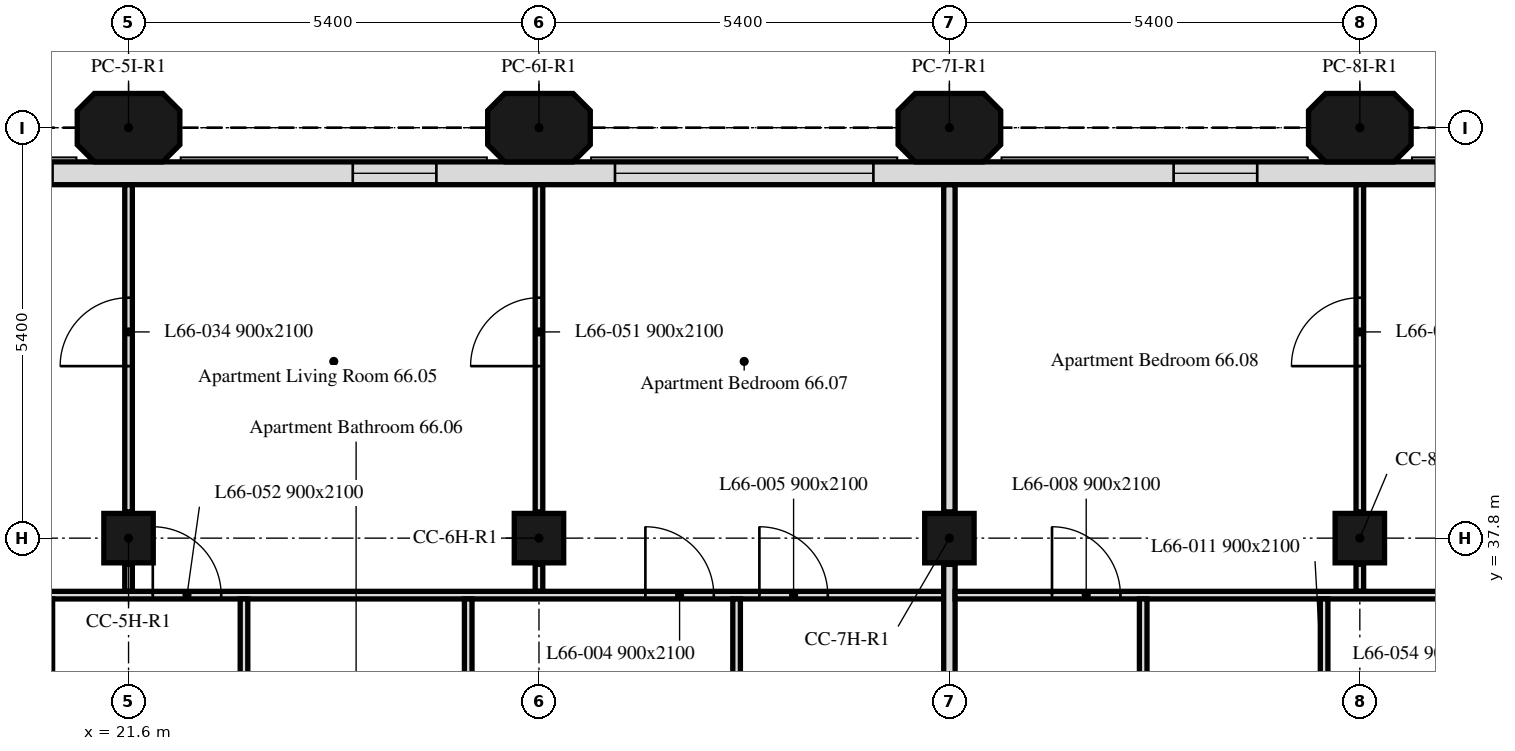
"""IFC4 building model, lengths in metres.
Left out: names, types, materials, properties, quantities, classifications, styles, units other than length and angle.
Written with IfcOpenShell. Run it as: python <this file> out.ifc"""

import sys

from ifc_helpers import new_model, si_unit, direction, frame, frame_2d, origin, origin_2d, place, context, subcontext, project, spatial, polyline, rectangle, outline, extrude, element, fill, save


model = new_model("IFC4")
c1 = context("Model", 3, precision=1e-05, world=origin(), true_north=direction((0.0, 1.0)))
c2 = subcontext(c1, "Body", "Model", "MODEL_VIEW")
j1 = project(units=[si_unit("LENGTHUNIT", "METRE"), si_unit("PLANEANGLEUNIT", "RADIAN")], contexts=[c1])
p1 = place(None, origin())
s1 = spatial("IfcSite", under=j1, at=p1, CompositionType="ELEMENT")
p2 = place(p1, origin())
s2 = spatial("IfcBuilding", under=s1, at=p2, CompositionType="ELEMENT")
p3 = place(p2, frame((0.0, 0.0, 271.9)))
s3 = spatial("IfcBuildingStorey", under=s2, at=p3, CompositionType="ELEMENT", Elevation=271.9)
for number, where, z_axis, x_axis in (
    (1, (21.6, 37.8, 0.0), (0.0, 0.0, 1.0), (1.0, 0.0, 0.0)),
    (2, (27.0, 37.8, 0.0), (0.0, 0.0, 1.0), (1.0, 0.0, 0.0)),
    (3, (32.4, 37.8, 0.0), (0.0, 0.0, 1.0), (1.0, 0.0, 0.0)),
    (4, (37.8, 37.8, 0.0), (0.0, 0.0, 1.0), (1.0, 0.0, 0.0)),
):
    element("IfcColumn", number, at=place(p3, frame(where, z_axis=z_axis, x_axis=x_axis)), inside=s3, PredefinedType="COLUMN", context=c2, shape_type="SweptSolid", body=[
        extrude(rectangle(XDim=0.65, YDim=0.65, at=origin_2d()), origin(), (0.0, 0.0, 1.0), 3.0),
    ])
for number, where, z_axis, x_axis in (
    (5, (21.6, 43.2, 0.0), (0.0, 0.0, 1.0), (1.0, 0.0, 0.0)),
    (6, (27.0, 43.2, 0.0), (0.0, 0.0, 1.0), (1.0, 0.0, 0.0)),
    (7, (32.4, 43.2, 0.0), (0.0, 0.0, 1.0), (1.0, 0.0, 0.0)),
    (8, (37.8, 43.2, 0.0), (0.0, 0.0, 1.0), (1.0, 0.0, 0.0)),
):
    element("IfcColumn", number, at=place(p3, frame(where, z_axis=z_axis, x_axis=x_axis)), inside=s3, PredefinedType="COLUMN", context=c2, shape_type="SweptSolid", body=[
        extrude(outline(polyline([(-0.45, -0.45), (0.45, -0.45), (0.675, -0.225), (0.675, 0.225), (0.45, 0.45), (-0.45, 0.45), (-0.675, 0.225), (-0.675, -0.225), (-0.45, -0.45)])), origin(), (0.0, 0.0, 1.0), 3.0),
    ])
p4 = place(p3, frame((43.014, 42.6, 0.0), z_axis=(0.0, 0.0, 1.0), x_axis=(-1.0, 0.0, 0.0)))
e9 = element("IfcWall", 9, at=p4, inside=s3, PredefinedType="SOLIDWALL", context=c2, shape_type="SweptSolid", body=[
    extrude(rectangle(XDim=32.027, YDim=0.3, at=frame_2d((16.014, 0.0))), origin(), (0.0, 0.0, 1.0), 3.0),
])
p5 = place(p4, frame((0.814, 0.0, 0.9)))
e10 = element("IfcOpeningElement", 10, at=p5, cuts=e9, PredefinedType="OPENING", context=c2, shape_type="SweptSolid", body=[
    extrude(rectangle(XDim=3.4, YDim=1.7, at=frame_2d((1.7, 0.85))), frame((0.0, 0.16, 0.0), z_axis=(0.0, -1.0, 0.0), x_axis=(1.0, 0.0, 0.0)), (0.0, 0.0, 1.0), 0.32),
])
p6 = place(p4, frame((6.564, 0.0, 0.9)))
e11 = element("IfcOpeningElement", 11, at=p6, cuts=e9, PredefinedType="OPENING", context=c2, shape_type="SweptSolid", body=[
    extrude(rectangle(XDim=1.1, YDim=1.7, at=frame_2d((0.55, 0.85))), frame((0.0, 0.16, 0.0), z_axis=(0.0, -1.0, 0.0), x_axis=(1.0, 0.0, 0.0)), (0.0, 0.0, 1.0), 0.32),
])
p7 = place(p4, frame((11.614, 0.0, 0.9)))
e12 = element("IfcOpeningElement", 12, at=p7, cuts=e9, PredefinedType="OPENING", context=c2, shape_type="SweptSolid", body=[
    extrude(rectangle(XDim=3.4, YDim=1.7, at=frame_2d((1.7, 0.85))), frame((0.0, 0.16, 0.0), z_axis=(0.0, -1.0, 0.0), x_axis=(1.0, 0.0, 0.0)), (0.0, 0.0, 1.0), 0.32),
])
p8 = place(p4, frame((17.364, 0.0, 0.9)))
e13 = element("IfcOpeningElement", 13, at=p8, cuts=e9, PredefinedType="OPENING", context=c2, shape_type="SweptSolid", body=[
    extrude(rectangle(XDim=1.1, YDim=1.7, at=frame_2d((0.55, 0.85))), frame((0.0, 0.16, 0.0), z_axis=(0.0, -1.0, 0.0), x_axis=(1.0, 0.0, 0.0)), (0.0, 0.0, 1.0), 0.32),
])
p9 = place(p4, frame((22.414, 0.0, 0.9)))
e14 = element("IfcOpeningElement", 14, at=p9, cuts=e9, PredefinedType="OPENING", context=c2, shape_type="SweptSolid", body=[
    extrude(rectangle(XDim=3.4, YDim=1.7, at=frame_2d((1.7, 0.85))), frame((0.0, 0.16, 0.0), z_axis=(0.0, -1.0, 0.0), x_axis=(1.0, 0.0, 0.0)), (0.0, 0.0, 1.0), 0.32),
])
p10 = place(p4, frame((28.164, 0.0, 0.9)))
e15 = element("IfcOpeningElement", 15, at=p10, cuts=e9, PredefinedType="OPENING", context=c2, shape_type="SweptSolid", body=[
    extrude(rectangle(XDim=1.1, YDim=1.7, at=frame_2d((0.55, 0.85))), frame((0.0, 0.16, 0.0), z_axis=(0.0, -1.0, 0.0), x_axis=(1.0, 0.0, 0.0)), (0.0, 0.0, 1.0), 0.32),
])
p11 = place(p3, frame((21.6, 37.1, 0.0), z_axis=(0.0, 0.0, 1.0), x_axis=(0.0, 1.0, 0.0)))
e16 = element("IfcWall", 16, at=p11, inside=s3, PredefinedType="PARTITIONING", context=c2, shape_type="SweptSolid", body=[
    extrude(rectangle(XDim=0.355, YDim=0.1, at=frame_2d((0.177, 0.0))), origin(), (0.0, 0.0, 1.0), 3.0),
])
p12 = place(p3, frame((21.6, 38.145, 0.0), z_axis=(0.0, 0.0, 1.0), x_axis=(0.0, 1.0, 0.0)))
e17 = element("IfcWall", 17, at=p12, inside=s3, PredefinedType="PARTITIONING", context=c2, shape_type="SweptSolid", body=[
    extrude(rectangle(XDim=4.304, YDim=0.1, at=frame_2d((2.152, 0.0))), origin(), (0.0, 0.0, 1.0), 3.0),
])
p13 = place(p12, frame((1.918, 0.0, 0.0)))
e18 = element("IfcOpeningElement", 18, at=p13, cuts=e17, PredefinedType="OPENING", context=c2, shape_type="SweptSolid", body=[
    extrude(rectangle(XDim=0.9, YDim=2.1, at=frame_2d((0.45, 1.05))), frame((0.0, 0.05, 0.0), z_axis=(0.0, -1.0, 0.0), x_axis=(1.0, 0.0, 0.0)), (0.0, 0.0, 1.0), 0.1),
])
p14 = place(p3, frame((27.0, 37.1, 0.0), z_axis=(0.0, 0.0, 1.0), x_axis=(0.0, 1.0, 0.0)))
e19 = element("IfcWall", 19, at=p14, inside=s3, PredefinedType="PARTITIONING", context=c2, shape_type="SweptSolid", body=[
    extrude(rectangle(XDim=0.355, YDim=0.1, at=frame_2d((0.177, 0.0))), origin(), (0.0, 0.0, 1.0), 3.0),
])
p15 = place(p3, frame((27.0, 38.145, 0.0), z_axis=(0.0, 0.0, 1.0), x_axis=(0.0, 1.0, 0.0)))
e20 = element("IfcWall", 20, at=p15, inside=s3, PredefinedType="PARTITIONING", context=c2, shape_type="SweptSolid", body=[
    extrude(rectangle(XDim=4.304, YDim=0.1, at=frame_2d((2.152, 0.0))), origin(), (0.0, 0.0, 1.0), 3.0),
])
p16 = place(p15, frame((1.918, 0.0, 0.0)))
e21 = element("IfcOpeningElement", 21, at=p16, cuts=e20, PredefinedType="OPENING", context=c2, shape_type="SweptSolid", body=[
    extrude(rectangle(XDim=0.9, YDim=2.1, at=frame_2d((0.45, 1.05))), frame((0.0, 0.05, 0.0), z_axis=(0.0, -1.0, 0.0), x_axis=(1.0, 0.0, 0.0)), (0.0, 0.0, 1.0), 0.1),
])
p17 = place(p3, frame((16.275, 37.05, 0.0), z_axis=(0.0, 0.0, 1.0), x_axis=(1.0, 0.0, 0.0)))
e22 = element("IfcWall", 22, at=p17, inside=s3, PredefinedType="PARTITIONING", context=c2, shape_type="SweptSolid", body=[
    extrude(rectangle(XDim=16.05, YDim=0.1, at=frame_2d((8.025, 0.0))), origin(), (0.0, 0.0, 1.0), 3.0),
])
p18 = place(p17, frame((1.453, 0.0, 0.0)))
e23 = element("IfcOpeningElement", 23, at=p18, cuts=e22, PredefinedType="OPENING", context=c2, shape_type="SweptSolid", body=[
    extrude(rectangle(XDim=0.9, YDim=2.1, at=frame_2d((0.45, 1.05))), frame((0.0, 0.05, 0.0), z_axis=(0.0, -1.0, 0.0), x_axis=(1.0, 0.0, 0.0)), (0.0, 0.0, 1.0), 0.1),
])
p19 = place(p17, frame((12.125, 0.0, 0.0)))
e24 = element("IfcOpeningElement", 24, at=p19, cuts=e22, PredefinedType="OPENING", context=c2, shape_type="SweptSolid", body=[
    extrude(rectangle(XDim=0.9, YDim=2.1, at=frame_2d((0.45, 1.05))), frame((0.0, 0.05, 0.0), z_axis=(0.0, -1.0, 0.0), x_axis=(1.0, 0.0, 0.0)), (0.0, 0.0, 1.0), 0.1),
])
p20 = place(p17, frame((13.625, 0.0, 0.0)))
e25 = element("IfcOpeningElement", 25, at=p20, cuts=e22, PredefinedType="OPENING", context=c2, shape_type="SweptSolid", body=[
    extrude(rectangle(XDim=0.9, YDim=2.1, at=frame_2d((0.45, 1.05))), frame((0.0, 0.05, 0.0), z_axis=(0.0, -1.0, 0.0), x_axis=(1.0, 0.0, 0.0)), (0.0, 0.0, 1.0), 0.1),
])
p21 = place(p17, frame((5.644, 0.0, 0.0)))
e26 = element("IfcOpeningElement", 26, at=p21, cuts=e22, PredefinedType="OPENING", context=c2, shape_type="SweptSolid", body=[
    extrude(rectangle(XDim=0.9, YDim=2.1, at=frame_2d((0.45, 1.05))), frame((0.0, 0.05, 0.0), z_axis=(0.0, -1.0, 0.0), x_axis=(1.0, 0.0, 0.0)), (0.0, 0.0, 1.0), 0.1),
])
p22 = place(p3, frame((32.4, 38.145, 0.0), z_axis=(0.0, 0.0, 1.0), x_axis=(0.0, 1.0, 0.0)))
e27 = element("IfcWall", 27, at=p22, inside=s3, PredefinedType="PARTITIONING", context=c2, shape_type="SweptSolid", body=[
    extrude(rectangle(XDim=4.304, YDim=0.15, at=frame_2d((2.152, 0.0))), origin(), (0.0, 0.0, 1.0), 3.0),
])
p23 = place(p3, frame((20.551, 34.725, 0.0), z_axis=(0.0, 0.0, 1.0), x_axis=(0.0, 1.0, 0.0)))
e28 = element("IfcWall", 28, at=p23, inside=s3, PredefinedType="PARTITIONING", context=c2, shape_type="SweptSolid", body=[
    extrude(rectangle(XDim=2.275, YDim=0.1, at=frame_2d((1.137, 0.0))), origin(), (0.0, 0.0, 1.0), 3.0),
])
p24 = place(p23, frame((0.25, 0.0, 0.0)))
e29 = element("IfcOpeningElement", 29, at=p24, cuts=e28, PredefinedType="OPENING", context=c2, shape_type="SweptSolid", body=[
    extrude(rectangle(XDim=0.9, YDim=2.1, at=frame_2d((0.45, 1.05))), frame((0.0, 0.05, 0.0), z_axis=(0.0, -1.0, 0.0), x_axis=(1.0, 0.0, 0.0)), (0.0, 0.0, 1.0), 0.1),
])
p25 = place(p3, frame((23.119, 34.725, 0.0), z_axis=(0.0, 0.0, 1.0), x_axis=(0.0, 1.0, 0.0)))
e30 = element("IfcWall", 30, at=p25, inside=s3, PredefinedType="PARTITIONING", context=c2, shape_type="SweptSolid", body=[
    extrude(rectangle(XDim=2.275, YDim=0.1, at=frame_2d((1.137, 0.0))), origin(), (0.0, 0.0, 1.0), 3.0),
])
p26 = place(p25, frame((0.25, 0.0, 0.0)))
e31 = element("IfcOpeningElement", 31, at=p26, cuts=e30, PredefinedType="OPENING", context=c2, shape_type="SweptSolid", body=[
    extrude(rectangle(XDim=0.9, YDim=2.1, at=frame_2d((0.45, 1.05))), frame((0.0, 0.05, 0.0), z_axis=(0.0, -1.0, 0.0), x_axis=(1.0, 0.0, 0.0)), (0.0, 0.0, 1.0), 0.1),
])
for number, where, z_axis, x_axis in (
    (32, (26.069, 34.725, 0.0), (0.0, 0.0, 1.0), (0.0, 1.0, 0.0)),
    (33, (29.6, 34.725, 0.0), (0.0, 0.0, 1.0), (0.0, 1.0, 0.0)),
):
    element("IfcWall", number, at=place(p3, frame(where, z_axis=z_axis, x_axis=x_axis)), inside=s3, PredefinedType="PARTITIONING", context=c2, shape_type="SweptSolid", body=[
        extrude(rectangle(XDim=2.275, YDim=0.1, at=frame_2d((1.137, 0.0))), origin(), (0.0, 0.0, 1.0), 3.0),
    ])
p27 = place(p3, frame((32.4, 34.725, 0.0), z_axis=(0.0, 0.0, 1.0), x_axis=(0.0, 1.0, 0.0)))
e34 = element("IfcWall", 34, at=p27, inside=s3, PredefinedType="PARTITIONING", context=c2, shape_type="SweptSolid", body=[
    extrude(rectangle(XDim=2.73, YDim=0.15, at=frame_2d((1.365, 0.0))), origin(), (0.0, 0.0, 1.0), 3.0),
])
p28 = place(p3, frame((37.8, 37.1, 0.0), z_axis=(0.0, 0.0, 1.0), x_axis=(0.0, 1.0, 0.0)))
e35 = element("IfcWall", 35, at=p28, inside=s3, PredefinedType="PARTITIONING", context=c2, shape_type="SweptSolid", body=[
    extrude(rectangle(XDim=0.355, YDim=0.1, at=frame_2d((0.177, 0.0))), origin(), (0.0, 0.0, 1.0), 3.0),
])
p29 = place(p3, frame((37.8, 38.145, 0.0), z_axis=(0.0, 0.0, 1.0), x_axis=(0.0, 1.0, 0.0)))
e36 = element("IfcWall", 36, at=p29, inside=s3, PredefinedType="PARTITIONING", context=c2, shape_type="SweptSolid", body=[
    extrude(rectangle(XDim=4.304, YDim=0.1, at=frame_2d((2.152, 0.0))), origin(), (0.0, 0.0, 1.0), 3.0),
])
p30 = place(p29, frame((1.918, 0.0, 0.0)))
e37 = element("IfcOpeningElement", 37, at=p30, cuts=e36, PredefinedType="OPENING", context=c2, shape_type="SweptSolid", body=[
    extrude(rectangle(XDim=0.9, YDim=2.1, at=frame_2d((0.45, 1.05))), frame((0.0, 0.05, 0.0), z_axis=(0.0, -1.0, 0.0), x_axis=(1.0, 0.0, 0.0)), (0.0, 0.0, 1.0), 0.1),
])
p31 = place(p3, frame((32.475, 37.05, 0.0), z_axis=(0.0, 0.0, 1.0), x_axis=(1.0, 0.0, 0.0)))
e38 = element("IfcWall", 38, at=p31, inside=s3, PredefinedType="PARTITIONING", context=c2, shape_type="SweptSolid", body=[
    extrude(rectangle(XDim=10.485, YDim=0.1, at=frame_2d((5.242, 0.0))), origin(), (0.0, 0.0, 1.0), 3.0),
])
p32 = place(p31, frame((1.275, 0.0, 0.0)))
e39 = element("IfcOpeningElement", 39, at=p32, cuts=e38, PredefinedType="OPENING", context=c2, shape_type="SweptSolid", body=[
    extrude(rectangle(XDim=0.9, YDim=2.1, at=frame_2d((0.45, 1.05))), frame((0.0, 0.05, 0.0), z_axis=(0.0, -1.0, 0.0), x_axis=(1.0, 0.0, 0.0)), (0.0, 0.0, 1.0), 0.1),
])
p33 = place(p31, frame((6.535, 0.0, 0.0)))
e40 = element("IfcOpeningElement", 40, at=p33, cuts=e38, PredefinedType="OPENING", context=c2, shape_type="SweptSolid", body=[
    extrude(rectangle(XDim=0.9, YDim=2.1, at=frame_2d((0.45, 1.05))), frame((0.0, 0.05, 0.0), z_axis=(0.0, -1.0, 0.0), x_axis=(1.0, 0.0, 0.0)), (0.0, 0.0, 1.0), 0.1),
])
p34 = place(p3, frame((34.95, 34.725, 0.0), z_axis=(0.0, 0.0, 1.0), x_axis=(0.0, 1.0, 0.0)))
e41 = element("IfcWall", 41, at=p34, inside=s3, PredefinedType="PARTITIONING", context=c2, shape_type="SweptSolid", body=[
    extrude(rectangle(XDim=2.275, YDim=0.1, at=frame_2d((1.137, 0.0))), origin(), (0.0, 0.0, 1.0), 3.0),
])
p35 = place(p3, frame((37.33, 34.725, 0.0), z_axis=(0.0, 0.0, 1.0), x_axis=(0.0, 1.0, 0.0)))
e42 = element("IfcWall", 42, at=p35, inside=s3, PredefinedType="PARTITIONING", context=c2, shape_type="SweptSolid", body=[
    extrude(rectangle(XDim=2.275, YDim=0.1, at=frame_2d((1.137, 0.0))), origin(), (0.0, 0.0, 1.0), 3.0),
])
p36 = place(p35, frame((0.25, 0.0, 0.0)))
e43 = element("IfcOpeningElement", 43, at=p36, cuts=e42, PredefinedType="OPENING", context=c2, shape_type="SweptSolid", body=[
    extrude(rectangle(XDim=0.9, YDim=2.1, at=frame_2d((0.45, 1.05))), frame((0.0, 0.05, 0.0), z_axis=(0.0, -1.0, 0.0), x_axis=(1.0, 0.0, 0.0)), (0.0, 0.0, 1.0), 0.1),
])
p37 = place(p6, origin())
e44 = element("IfcWindow", 44, at=p37, inside=s3, PartitioningType="SINGLE_PANEL", PredefinedType="WINDOW", context=c2, shape_type="SweptSolid", body=[
    extrude(rectangle(XDim=1.1, YDim=1.7, at=frame_2d((0.55, 0.85))), frame((0.0, 0.03, 0.0), z_axis=(0.0, -1.0, 0.0), x_axis=(1.0, 0.0, 0.0)), (0.0, 0.0, 1.0), 0.06),
])
fill(e11, e44)
p38 = place(p7, origin())
e45 = element("IfcWindow", 45, at=p38, inside=s3, PartitioningType="SINGLE_PANEL", PredefinedType="WINDOW", context=c2, shape_type="SweptSolid", body=[
    extrude(rectangle(XDim=3.4, YDim=1.7, at=frame_2d((1.7, 0.85))), frame((0.0, 0.03, 0.0), z_axis=(0.0, -1.0, 0.0), x_axis=(1.0, 0.0, 0.0)), (0.0, 0.0, 1.0), 0.06),
])
fill(e12, e45)
p39 = place(p8, origin())
e46 = element("IfcWindow", 46, at=p39, inside=s3, PartitioningType="SINGLE_PANEL", PredefinedType="WINDOW", context=c2, shape_type="SweptSolid", body=[
    extrude(rectangle(XDim=1.1, YDim=1.7, at=frame_2d((0.55, 0.85))), frame((0.0, 0.03, 0.0), z_axis=(0.0, -1.0, 0.0), x_axis=(1.0, 0.0, 0.0)), (0.0, 0.0, 1.0), 0.06),
])
fill(e13, e46)
p40 = place(p19, origin())
e47 = element("IfcDoor", 47, at=p40, inside=s3, OperationType="SINGLE_SWING_LEFT", PredefinedType="DOOR", context=c2, shape_type="SweptSolid", body=[
    extrude(rectangle(XDim=0.9, YDim=2.1, at=frame_2d((0.45, 1.05))), frame((0.0, 0.025, 0.0), z_axis=(0.0, -1.0, 0.0), x_axis=(1.0, 0.0, 0.0)), (0.0, 0.0, 1.0), 0.05),
])
fill(e24, e47)
p41 = place(p20, origin())
e48 = element("IfcDoor", 48, at=p41, inside=s3, OperationType="SINGLE_SWING_RIGHT", PredefinedType="DOOR", context=c2, shape_type="SweptSolid", body=[
    extrude(rectangle(XDim=0.9, YDim=2.1, at=frame_2d((0.45, 1.05))), frame((0.0, 0.025, 0.0), z_axis=(0.0, -1.0, 0.0), x_axis=(1.0, 0.0, 0.0)), (0.0, 0.0, 1.0), 0.05),
])
fill(e25, e48)
p42 = place(p32, origin())
e49 = element("IfcDoor", 49, at=p42, inside=s3, OperationType="SINGLE_SWING_RIGHT", PredefinedType="DOOR", context=c2, shape_type="SweptSolid", body=[
    extrude(rectangle(XDim=0.9, YDim=2.1, at=frame_2d((0.45, 1.05))), frame((0.0, 0.025, 0.0), z_axis=(0.0, -1.0, 0.0), x_axis=(1.0, 0.0, 0.0)), (0.0, 0.0, 1.0), 0.05),
])
fill(e39, e49)
p43 = place(p13, origin())
e50 = element("IfcDoor", 50, at=p43, inside=s3, OperationType="SINGLE_SWING_LEFT", PredefinedType="DOOR", context=c2, shape_type="SweptSolid", body=[
    extrude(rectangle(XDim=0.9, YDim=2.1, at=frame_2d((0.45, 1.05))), frame((0.0, 0.025, 0.0), z_axis=(0.0, -1.0, 0.0), x_axis=(1.0, 0.0, 0.0)), (0.0, 0.0, 1.0), 0.05),
])
fill(e18, e50)
p44 = place(p30, origin())
e51 = element("IfcDoor", 51, at=p44, inside=s3, OperationType="SINGLE_SWING_RIGHT", PredefinedType="DOOR", context=c2, shape_type="SweptSolid", body=[
    extrude(rectangle(XDim=0.9, YDim=2.1, at=frame_2d((0.45, 1.05))), frame((0.0, 0.025, 0.0), z_axis=(0.0, -1.0, 0.0), x_axis=(1.0, 0.0, 0.0)), (0.0, 0.0, 1.0), 0.05),
])
fill(e37, e51)
p45 = place(p16, origin())
e52 = element("IfcDoor", 52, at=p45, inside=s3, OperationType="SINGLE_SWING_RIGHT", PredefinedType="DOOR", context=c2, shape_type="SweptSolid", body=[
    extrude(rectangle(XDim=0.9, YDim=2.1, at=frame_2d((0.45, 1.05))), frame((0.0, 0.025, 0.0), z_axis=(0.0, -1.0, 0.0), x_axis=(1.0, 0.0, 0.0)), (0.0, 0.0, 1.0), 0.05),
])
fill(e21, e52)
p46 = place(p21, origin())
e53 = element("IfcDoor", 53, at=p46, inside=s3, OperationType="SINGLE_SWING_RIGHT", PredefinedType="DOOR", context=c2, shape_type="SweptSolid", body=[
    extrude(rectangle(XDim=0.9, YDim=2.1, at=frame_2d((0.45, 1.05))), frame((0.0, 0.025, 0.0), z_axis=(0.0, -1.0, 0.0), x_axis=(1.0, 0.0, 0.0)), (0.0, 0.0, 1.0), 0.05),
])
fill(e26, e53)
save(model, sys.argv[1])
